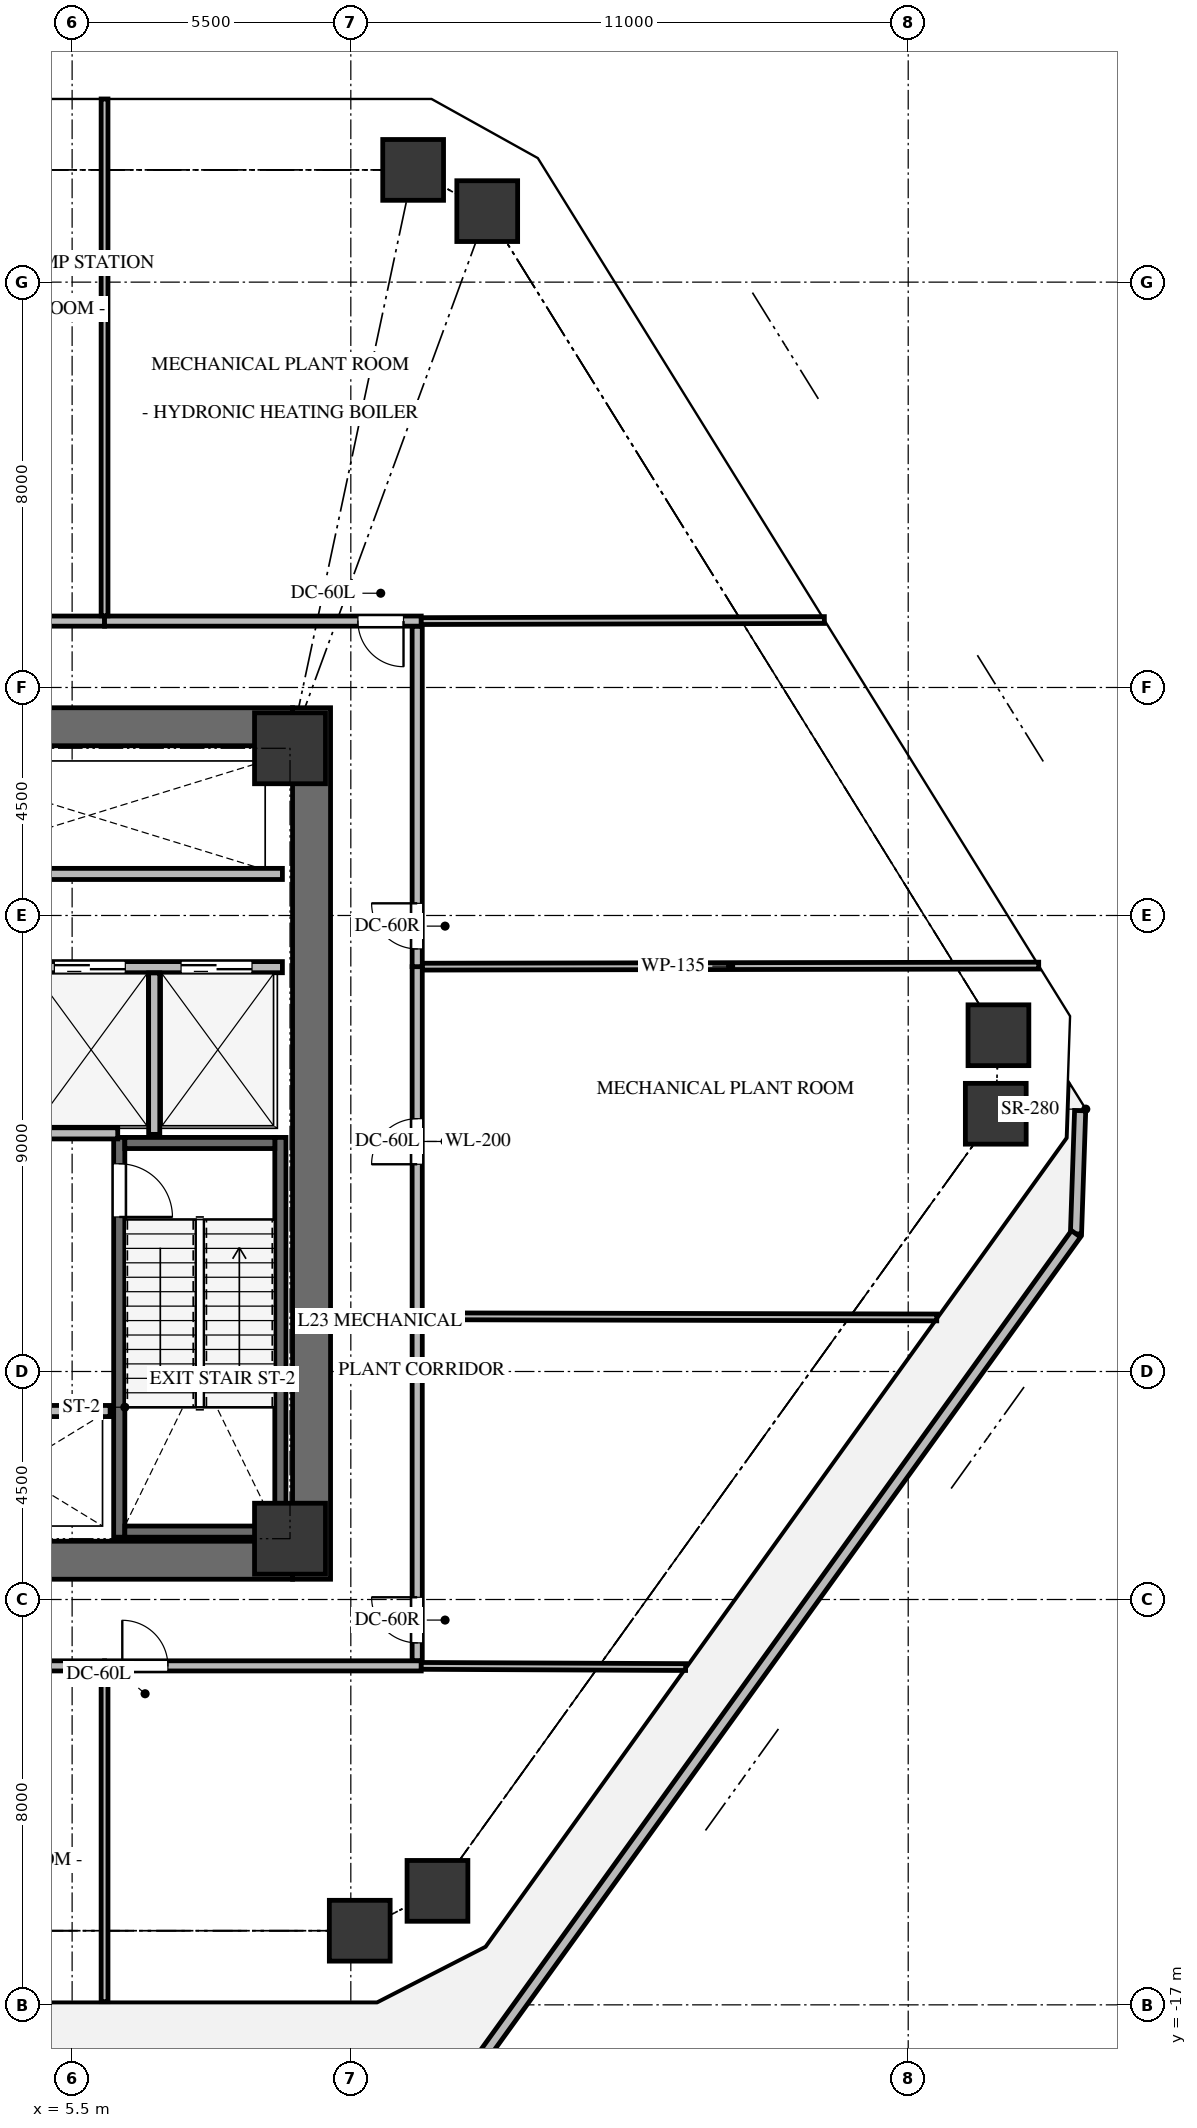
"""IFC4 building model, lengths in metres.
Left out: names, types, materials, properties, quantities, classifications, styles, units other than length and angle.
Written with IfcOpenShell. Run it as: python <this file> out.ifc"""

import sys

from ifc_helpers import new_model, si_unit, direction, frame, frame_2d, origin, origin_2d, place, context, subcontext, project, spatial, rectangle, extrude, source, transform, mapped, element, fill, save


model = new_model("IFC4")
c1 = context("Model", 3, precision=1e-05, world=origin(), true_north=direction((0.0, 1.0)))
c2 = subcontext(c1, "Body", "Model", "MODEL_VIEW")
j1 = project(units=[si_unit("LENGTHUNIT", "METRE"), si_unit("PLANEANGLEUNIT", "RADIAN")], contexts=[c1])
p1 = place(None, origin())
s1 = spatial("IfcSite", under=j1, at=p1, CompositionType="ELEMENT")
p2 = place(p1, origin())
s2 = spatial("IfcBuilding", under=s1, at=p2, CompositionType="ELEMENT")
p3 = place(p2, frame((0.0, 0.0, 88.5)))
s3 = spatial("IfcBuildingStorey", under=s2, at=p3, CompositionType="ELEMENT", Elevation=88.5)
p4 = place(p3, frame((10.225, -8.6, 0.0), z_axis=(0.0, 0.0, 1.0), x_axis=(0.0, 1.0, 0.0)))
e1 = element("IfcWall", 1, at=p4, inside=s3, PredefinedType="SHEAR", context=c2, shape_type="SweptSolid", body=[
    extrude(rectangle(XDim=17.2, YDim=0.75, at=frame_2d((8.6, 0.0))), origin(), (0.0, 0.0, 1.0), 4.8),
])
p5 = place(p3, frame((2.1, -8.225, 0.0), z_axis=(0.0, 0.0, 1.0), x_axis=(1.0, 0.0, 0.0)))
e2 = element("IfcWall", 2, at=p5, inside=s3, PredefinedType="SHEAR", context=c2, shape_type="SweptSolid", body=[
    extrude(rectangle(XDim=7.75, YDim=0.75, at=frame_2d((3.875, 0.0))), origin(), (0.0, 0.0, 1.0), 4.8),
])
p6 = place(p3, frame((-9.85, 8.225, 0.0), z_axis=(0.0, 0.0, 1.0), x_axis=(1.0, 0.0, 0.0)))
e3 = element("IfcWall", 3, at=p6, inside=s3, PredefinedType="SHEAR", context=c2, shape_type="SweptSolid", body=[
    extrude(rectangle(XDim=19.7, YDim=0.75, at=frame_2d((9.85, 0.0))), origin(), (0.0, 0.0, 1.0), 4.8),
])
p7 = place(p3, frame((9.61, -7.77, -0.3), z_axis=(0.0, 0.0, 1.0), x_axis=(0.0, 1.0, 0.0)))
e4 = element("IfcWall", 4, at=p7, inside=s3, PredefinedType="SHEAR", context=c2, shape_type="SweptSolid", body=[
    extrude(rectangle(XDim=7.89, YDim=0.22, at=frame_2d((3.945, 0.0))), origin(), (0.0, 0.0, 1.0), 4.8),
])
p8 = place(p3, frame((6.43, 0.12, -0.3), z_axis=(0.0, 0.0, 1.0), x_axis=(0.0, -1.0, 0.0)))
e5 = element("IfcWall", 5, at=p8, inside=s3, PredefinedType="SHEAR", context=c2, shape_type="SweptSolid", body=[
    extrude(rectangle(XDim=7.89, YDim=0.22, at=frame_2d((3.945, 0.0))), origin(), (0.0, 0.0, 1.0), 4.8),
])
p9 = place(p8, frame((0.52, 0.0, 0.0)))
e6 = element("IfcOpeningElement", 6, at=p9, cuts=e5, PredefinedType="OPENING", context=c2, shape_type="SweptSolid", body=[
    extrude(rectangle(XDim=1.05, YDim=2.15, at=frame_2d((0.525, 1.075))), frame((0.0, 0.12, 0.0), z_axis=(0.0, -1.0, 0.0), x_axis=(1.0, 0.0, 0.0)), (0.0, 0.0, 1.0), 0.24),
])
for number, where, z_axis, x_axis in (
    (7, (6.54, -7.66, -0.3), (0.0, 0.0, 1.0), (1.0, 0.0, 0.0)),
    (8, (9.5, 0.01, -0.3), (0.0, 0.0, 1.0), (-1.0, 0.0, 0.0)),
):
    element("IfcWall", number, at=place(p3, frame(where, z_axis=z_axis, x_axis=x_axis)), inside=s3, PredefinedType="SHEAR", context=c2, shape_type="SweptSolid", body=[
        extrude(rectangle(XDim=2.96, YDim=0.22, at=frame_2d((1.48, 0.0))), origin(), (0.0, 0.0, 1.0), 4.8),
    ])
m1 = source(origin(), c2, "Body", "SweptSolid", [
    extrude(rectangle(XDim=1.4, YDim=1.4, at=origin_2d()), origin(), (0.0, 0.0, 1.0), 4.8),
])
for number, where, z_axis, x_axis in (
    (9, (9.8, -7.8, -0.3), (0.0, 0.0, 1.0), (1.0, 0.0, 0.0)),
    (10, (9.8, 7.8, -0.3), (0.0, 0.0, 1.0), (1.0, 0.0, 0.0)),
):
    element("IfcColumn", number, at=place(p3, frame(where, z_axis=z_axis, x_axis=x_axis)), inside=s3, PredefinedType="COLUMN", context=c2, shape_type="MappedRepresentation", body=[
        mapped(m1, transform((0.0, 0.0, 0.0), x_axis=(1.0, 0.0, 0.0), y_axis=(0.0, 1.0, 0.0), z_axis=(0.0, 0.0, 1.0), scale=1.0)),
    ])
m2 = source(origin(), c2, "Body", "SweptSolid", [
    extrude(rectangle(XDim=1.2, YDim=1.2, at=origin_2d()), origin(), (0.0, 0.0, 1.0), 4.8),
])
for number, where, z_axis, x_axis in (
    (11, (12.23, 19.215, -0.3), (0.0, 0.0, 1.0), (1.0, 0.0, 0.0)),
    (12, (13.692, 18.401, -0.3), (0.0, 0.0, 1.0), (1.0, 0.0, 0.0)),
    (13, (23.781, 2.137, -0.3), (0.0, 0.0, 1.0), (1.0, 0.0, 0.0)),
    (14, (23.728, 0.587, -0.3), (0.0, 0.0, 1.0), (1.0, 0.0, 0.0)),
    (15, (12.71, -14.75, -0.3), (0.0, 0.0, 1.0), (1.0, 0.0, 0.0)),
    (16, (11.176, -15.537, -0.3), (0.0, 0.0, 1.0), (1.0, 0.0, 0.0)),
):
    element("IfcColumn", number, at=place(p3, frame(where, z_axis=z_axis, x_axis=x_axis)), inside=s3, PredefinedType="COLUMN", context=c2, shape_type="MappedRepresentation", body=[
        mapped(m2, transform((0.0, 0.0, 0.0), x_axis=(1.0, 0.0, 0.0), y_axis=(0.0, 1.0, 0.0), z_axis=(0.0, 0.0, 1.0), scale=1.0)),
    ])
p10 = place(p3, frame((25.393, 0.648, 0.0), z_axis=(0.0, 0.0, 1.0), x_axis=(-0.033815990117, -0.999428075858, 0.0)))
e17 = element("IfcWall", 17, at=p10, inside=s3, PredefinedType="PARAPET", context=c2, shape_type="SweptSolid", body=[
    extrude(rectangle(XDim=2.433, YDim=0.22, at=frame_2d((1.217, 0.0))), origin(), (0.0, 0.0, 1.0), 1.2),
])
p11 = place(p3, frame((25.311, -1.783, 0.0), z_axis=(0.0, 0.0, 1.0), x_axis=(-0.584819348165, -0.81116356551, 0.0)))
e18 = element("IfcWall", 18, at=p11, inside=s3, PredefinedType="PARAPET", context=c2, shape_type="SweptSolid", body=[
    extrude(rectangle(XDim=21.441, YDim=0.22, at=frame_2d((10.72, 0.0))), origin(), (0.0, 0.0, 1.0), 1.2),
])
p12 = place(p3, frame((4.6, 3.48, 0.0), z_axis=(0.0, 0.0, 1.0), x_axis=(1.0, 0.0, 0.0)))
e19 = element("IfcWall", 19, at=p12, inside=s3, PredefinedType="SOLIDWALL", context=c2, shape_type="SweptSolid", body=[
    extrude(rectangle(XDim=5.05, YDim=0.22, at=frame_2d((2.525, 0.0))), origin(), (0.0, 0.0, 1.0), 4.485),
])
p13 = place(p12, frame((0.55, 0.0, 0.0)))
e20 = element("IfcOpeningElement", 20, at=p13, cuts=e19, PredefinedType="OPENING", context=c2, shape_type="SweptSolid", body=[
    extrude(rectangle(XDim=1.4, YDim=2.15, at=frame_2d((0.7, 1.075))), frame((0.0, 0.12, 0.0), z_axis=(0.0, -1.0, 0.0), x_axis=(1.0, 0.0, 0.0)), (0.0, 0.0, 1.0), 0.24),
])
p14 = place(p12, frame((3.05, 0.0, 0.0)))
e21 = element("IfcOpeningElement", 21, at=p14, cuts=e19, PredefinedType="OPENING", context=c2, shape_type="SweptSolid", body=[
    extrude(rectangle(XDim=1.4, YDim=2.15, at=frame_2d((0.7, 1.075))), frame((0.0, 0.12, 0.0), z_axis=(0.0, -1.0, 0.0), x_axis=(1.0, 0.0, 0.0)), (0.0, 0.0, 1.0), 0.24),
])
p15 = place(p3, frame((7.12, 0.18, 0.0), z_axis=(0.0, 0.0, 1.0), x_axis=(0.0, 1.0, 0.0)))
e22 = element("IfcWall", 22, at=p15, inside=s3, PredefinedType="SOLIDWALL", context=c2, shape_type="SweptSolid", body=[
    extrude(rectangle(XDim=3.186, YDim=0.22, at=frame_2d((1.593, 0.0))), origin(), (0.0, 0.0, 1.0), 4.485),
])
p16 = place(p3, frame((4.734, 0.2, 0.0), z_axis=(0.0, 0.0, 1.0), x_axis=(1.0, 0.0, 0.0)))
e23 = element("IfcWall", 23, at=p16, inside=s3, PredefinedType="SOLIDWALL", context=c2, shape_type="SweptSolid", body=[
    extrude(rectangle(XDim=1.666, YDim=0.22, at=frame_2d((0.833, 0.0))), origin(), (0.0, 0.0, 1.0), 4.485),
])
p17 = place(p3, frame((2.35, -5.28, 0.0), z_axis=(0.0, 0.0, 1.0), x_axis=(1.0, 0.0, 0.0)))
e24 = element("IfcWall", 24, at=p17, inside=s3, PredefinedType="SOLIDWALL", context=c2, shape_type="SweptSolid", body=[
    extrude(rectangle(XDim=3.9, YDim=0.22, at=frame_2d((1.95, 0.0))), origin(), (0.0, 0.0, 1.0), 4.485),
])
p18 = place(p3, frame((2.325, 5.32, 0.0), z_axis=(0.0, 0.0, 1.0), x_axis=(1.0, 0.0, 0.0)))
e25 = element("IfcWall", 25, at=p18, inside=s3, PredefinedType="SOLIDWALL", context=c2, shape_type="SweptSolid", body=[
    extrude(rectangle(XDim=7.325, YDim=0.22, at=frame_2d((3.663, 0.0))), origin(), (0.0, 0.0, 1.0), 4.485),
])
p19 = place(p3, frame((6.14, 10.31, 0.0), z_axis=(0.0, 0.0, 1.0), x_axis=(-1.0, 0.0, 0.0)))
e26 = element("IfcWall", 26, at=p19, inside=s3, PredefinedType="SOLIDWALL", context=c2, shape_type="SweptSolid", body=[
    extrude(rectangle(XDim=6.1, YDim=0.2, at=frame_2d((3.05, 0.0))), origin(), (0.0, 0.0, 1.0), 4.048),
])
p20 = place(p19, frame((2.6, 0.0, 0.0)))
e27 = element("IfcOpeningElement", 27, at=p20, cuts=e26, PredefinedType="OPENING", context=c2, shape_type="SweptSolid", body=[
    extrude(rectangle(XDim=0.9, YDim=2.05, at=frame_2d((0.45, 1.025))), frame((0.0, 0.11, 0.0), z_axis=(0.0, -1.0, 0.0), x_axis=(1.0, 0.0, 0.0)), (0.0, 0.0, 1.0), 0.22),
])
p21 = place(p3, frame((12.39, 10.31, 0.0), z_axis=(0.0, 0.0, 1.0), x_axis=(-1.0, 0.0, 0.0)))
e28 = element("IfcWall", 28, at=p21, inside=s3, PredefinedType="SOLIDWALL", context=c2, shape_type="SweptSolid", body=[
    extrude(rectangle(XDim=6.25, YDim=0.2, at=frame_2d((3.125, 0.0))), origin(), (0.0, 0.0, 1.0), 3.652),
])
p22 = place(p21, frame((0.35, 0.0, 0.0)))
e29 = element("IfcOpeningElement", 29, at=p22, cuts=e28, PredefinedType="OPENING", context=c2, shape_type="SweptSolid", body=[
    extrude(rectangle(XDim=0.9, YDim=2.05, at=frame_2d((0.45, 1.025))), frame((0.0, 0.11, 0.0), z_axis=(0.0, -1.0, 0.0), x_axis=(1.0, 0.0, 0.0)), (0.0, 0.0, 1.0), 0.22),
])
p23 = place(p3, frame((0.04, -10.31, 0.0), z_axis=(0.0, 0.0, 1.0), x_axis=(1.0, 0.0, 0.0)))
e30 = element("IfcWall", 30, at=p23, inside=s3, PredefinedType="SOLIDWALL", context=c2, shape_type="SweptSolid", body=[
    extrude(rectangle(XDim=6.1, YDim=0.2, at=frame_2d((3.05, 0.0))), origin(), (0.0, 0.0, 1.0), 3.652),
])
p24 = place(p23, frame((2.6, 0.0, 0.0)))
e31 = element("IfcOpeningElement", 31, at=p24, cuts=e30, PredefinedType="OPENING", context=c2, shape_type="SweptSolid", body=[
    extrude(rectangle(XDim=0.9, YDim=2.05, at=frame_2d((0.45, 1.025))), frame((0.0, 0.11, 0.0), z_axis=(0.0, -1.0, 0.0), x_axis=(1.0, 0.0, 0.0)), (0.0, 0.0, 1.0), 0.22),
])
p25 = place(p3, frame((6.14, -10.31, 0.0), z_axis=(0.0, 0.0, 1.0), x_axis=(1.0, 0.0, 0.0)))
e32 = element("IfcWall", 32, at=p25, inside=s3, PredefinedType="SOLIDWALL", context=c2, shape_type="SweptSolid", body=[
    extrude(rectangle(XDim=6.25, YDim=0.2, at=frame_2d((3.125, 0.0))), origin(), (0.0, 0.0, 1.0), 3.652),
])
p26 = place(p25, frame((0.35, 0.0, 0.0)))
e33 = element("IfcOpeningElement", 33, at=p26, cuts=e32, PredefinedType="OPENING", context=c2, shape_type="SweptSolid", body=[
    extrude(rectangle(XDim=0.9, YDim=2.05, at=frame_2d((0.45, 1.025))), frame((0.0, 0.11, 0.0), z_axis=(0.0, -1.0, 0.0), x_axis=(1.0, 0.0, 0.0)), (0.0, 0.0, 1.0), 0.22),
])
p27 = place(p3, frame((12.31, -10.206, 0.0), z_axis=(0.0, 0.0, 1.0), x_axis=(0.0, 1.0, 0.0)))
e34 = element("IfcWall", 34, at=p27, inside=s3, PredefinedType="SOLIDWALL", context=c2, shape_type="SweptSolid", body=[
    extrude(rectangle(XDim=6.796, YDim=0.2, at=frame_2d((3.398, 0.0))), origin(), (0.0, 0.0, 1.0), 4.485),
])
p28 = place(p27, frame((0.35, 0.0, 0.0)))
e35 = element("IfcOpeningElement", 35, at=p28, cuts=e34, PredefinedType="OPENING", context=c2, shape_type="SweptSolid", body=[
    extrude(rectangle(XDim=0.9, YDim=2.05, at=frame_2d((0.45, 1.025))), frame((0.0, 0.11, 0.0), z_axis=(0.0, -1.0, 0.0), x_axis=(1.0, 0.0, 0.0)), (0.0, 0.0, 1.0), 0.22),
])
p29 = place(p3, frame((12.31, -3.41, 0.0), z_axis=(0.0, 0.0, 1.0), x_axis=(0.0, 1.0, 0.0)))
e36 = element("IfcWall", 36, at=p29, inside=s3, PredefinedType="SOLIDWALL", context=c2, shape_type="SweptSolid", body=[
    extrude(rectangle(XDim=6.9, YDim=0.2, at=frame_2d((3.45, 0.0))), origin(), (0.0, 0.0, 1.0), 3.652),
])
p30 = place(p29, frame((3.0, 0.0, 0.0)))
e37 = element("IfcOpeningElement", 37, at=p30, cuts=e36, PredefinedType="OPENING", context=c2, shape_type="SweptSolid", body=[
    extrude(rectangle(XDim=0.9, YDim=2.05, at=frame_2d((0.45, 1.025))), frame((0.0, 0.11, 0.0), z_axis=(0.0, -1.0, 0.0), x_axis=(1.0, 0.0, 0.0)), (0.0, 0.0, 1.0), 0.22),
])
p31 = place(p3, frame((12.31, 3.49, 0.0), z_axis=(0.0, 0.0, 1.0), x_axis=(0.0, 1.0, 0.0)))
e38 = element("IfcWall", 38, at=p31, inside=s3, PredefinedType="SOLIDWALL", context=c2, shape_type="SweptSolid", body=[
    extrude(rectangle(XDim=6.716, YDim=0.2, at=frame_2d((3.358, 0.0))), origin(), (0.0, 0.0, 1.0), 4.485),
])
p32 = place(p31, frame((0.35, 0.0, 0.0)))
e39 = element("IfcOpeningElement", 39, at=p32, cuts=e38, PredefinedType="OPENING", context=c2, shape_type="SweptSolid", body=[
    extrude(rectangle(XDim=0.9, YDim=2.05, at=frame_2d((0.45, 1.025))), frame((0.0, 0.11, 0.0), z_axis=(0.0, -1.0, 0.0), x_axis=(1.0, 0.0, 0.0)), (0.0, 0.0, 1.0), 0.22),
])
p33 = place(p3, frame((6.14, 20.615, 0.0), z_axis=(0.0, 0.0, 1.0), x_axis=(0.0, -1.0, 0.0)))
e40 = element("IfcWall", 40, at=p33, inside=s3, PredefinedType="PARTITIONING", context=c2, shape_type="SweptSolid", body=[
    extrude(rectangle(XDim=10.201, YDim=0.135, at=frame_2d((5.101, 0.0))), origin(), (0.0, 0.0, 1.0), 3.82),
])
p34 = place(p3, frame((20.345, 10.331, 0.0), z_axis=(0.0, 0.0, 1.0), x_axis=(-0.999996597928, -0.002608473296, 0.0)))
e41 = element("IfcWall", 41, at=p34, inside=s3, PredefinedType="PARTITIONING", context=c2, shape_type="SweptSolid", body=[
    extrude(rectangle(XDim=7.956, YDim=0.135, at=frame_2d((3.978, 0.0))), origin(), (0.0, 0.0, 1.0), 3.82),
])
p35 = place(p3, frame((6.14, -10.414, 0.0), z_axis=(0.0, 0.0, 1.0), x_axis=(0.0, -1.0, 0.0)))
e42 = element("IfcWall", 42, at=p35, inside=s3, PredefinedType="PARTITIONING", context=c2, shape_type="SweptSolid", body=[
    extrude(rectangle(XDim=6.523, YDim=0.135, at=frame_2d((3.261, 0.0))), origin(), (0.0, 0.0, 1.0), 3.652),
])
p36 = place(p3, frame((12.39, -10.31, 0.0), z_axis=(0.0, 0.0, 1.0), x_axis=(0.999990324999, -0.004398853037, 0.0)))
e43 = element("IfcWall", 43, at=p36, inside=s3, PredefinedType="PARTITIONING", context=c2, shape_type="SweptSolid", body=[
    extrude(rectangle(XDim=5.217, YDim=0.135, at=frame_2d((2.608, 0.0))), origin(), (0.0, 0.0, 1.0), 3.82),
])
p37 = place(p3, frame((12.414, -3.41, 0.0), z_axis=(0.0, 0.0, 1.0), x_axis=(0.999997389085, -0.002285131022, 0.0)))
e44 = element("IfcWall", 44, at=p37, inside=s3, PredefinedType="PARTITIONING", context=c2, shape_type="SweptSolid", body=[
    extrude(rectangle(XDim=10.15, YDim=0.135, at=frame_2d((5.075, 0.0))), origin(), (0.0, 0.0, 1.0), 3.82),
])
p38 = place(p3, frame((12.414, 3.49, 0.0), z_axis=(0.0, 0.0, 1.0), x_axis=(0.999998544192, 0.001706345129, 0.0)))
e45 = element("IfcWall", 45, at=p38, inside=s3, PredefinedType="PARTITIONING", context=c2, shape_type="SweptSolid", body=[
    extrude(rectangle(XDim=12.162, YDim=0.135, at=frame_2d((6.081, 0.0))), origin(), (0.0, 0.0, 1.0), 3.82),
])
m3 = source(origin(), c2, "Body", "SweptSolid", [
    extrude(rectangle(XDim=1.05, YDim=2.15, at=frame_2d((0.525, 1.075))), frame((0.0, 0.025, 0.0), z_axis=(0.0, -1.0, 0.0), x_axis=(1.0, 0.0, 0.0)), (0.0, 0.0, 1.0), 0.05),
])
p39 = place(p9, origin())
e46 = element("IfcDoor", 46, at=p39, inside=s3, OperationType="SINGLE_SWING_RIGHT", PredefinedType="DOOR", context=c2, shape_type="MappedRepresentation", body=[
    mapped(m3, transform((0.0, 0.0, 0.0), x_axis=(1.0, 0.0, 0.0), y_axis=(0.0, 1.0, 0.0), z_axis=(0.0, 0.0, 1.0), scale=1.0)),
])
fill(e6, e46)
m4 = source(origin(), c2, "Body", "SweptSolid", [
    extrude(rectangle(XDim=1.4, YDim=2.15, at=frame_2d((0.7, 1.075))), frame((0.0, 0.025, 0.0), z_axis=(0.0, -1.0, 0.0), x_axis=(1.0, 0.0, 0.0)), (0.0, 0.0, 1.0), 0.05),
])
p40 = place(p13, origin())
e47 = element("IfcDoor", 47, at=p40, inside=s3, OperationType="DOUBLE_DOOR_SLIDING", PredefinedType="DOOR", context=c2, shape_type="MappedRepresentation", body=[
    mapped(m4, transform((0.0, 0.0, 0.0), x_axis=(1.0, 0.0, 0.0), y_axis=(0.0, 1.0, 0.0), z_axis=(0.0, 0.0, 1.0), scale=1.0)),
])
fill(e20, e47)
p41 = place(p14, origin())
e48 = element("IfcDoor", 48, at=p41, inside=s3, OperationType="DOUBLE_DOOR_SLIDING", PredefinedType="DOOR", context=c2, shape_type="MappedRepresentation", body=[
    mapped(m4, transform((0.0, 0.0, 0.0), x_axis=(1.0, 0.0, 0.0), y_axis=(0.0, 1.0, 0.0), z_axis=(0.0, 0.0, 1.0), scale=1.0)),
])
fill(e21, e48)
m5 = source(origin(), c2, "Body", "SweptSolid", [
    extrude(rectangle(XDim=0.9, YDim=2.05, at=frame_2d((0.45, 1.025))), frame((0.0, 0.025, 0.0), z_axis=(0.0, -1.0, 0.0), x_axis=(1.0, 0.0, 0.0)), (0.0, 0.0, 1.0), 0.05),
])
p42 = place(p22, origin())
e49 = element("IfcDoor", 49, at=p42, inside=s3, OperationType="SINGLE_SWING_LEFT", PredefinedType="DOOR", context=c2, shape_type="MappedRepresentation", body=[
    mapped(m5, transform((0.0, 0.0, 0.0), x_axis=(1.0, 0.0, 0.0), y_axis=(0.0, 1.0, 0.0), z_axis=(0.0, 0.0, 1.0), scale=1.0)),
])
fill(e29, e49)
p43 = place(p26, origin())
e50 = element("IfcDoor", 50, at=p43, inside=s3, OperationType="SINGLE_SWING_LEFT", PredefinedType="DOOR", context=c2, shape_type="MappedRepresentation", body=[
    mapped(m5, transform((0.0, 0.0, 0.0), x_axis=(1.0, 0.0, 0.0), y_axis=(0.0, 1.0, 0.0), z_axis=(0.0, 0.0, 1.0), scale=1.0)),
])
fill(e33, e50)
m6 = source(origin(), c2, "Body", "SweptSolid", [
    extrude(rectangle(XDim=0.9, YDim=2.05, at=frame_2d((0.45, 1.025))), frame((0.0, 0.025, 0.0), z_axis=(0.0, -1.0, 0.0), x_axis=(1.0, 0.0, 0.0)), (0.0, 0.0, 1.0), 0.05),
])
p44 = place(p28, origin())
e51 = element("IfcDoor", 51, at=p44, inside=s3, OperationType="SINGLE_SWING_RIGHT", PredefinedType="DOOR", context=c2, shape_type="MappedRepresentation", body=[
    mapped(m6, transform((0.0, 0.0, 0.0), x_axis=(1.0, 0.0, 0.0), y_axis=(0.0, 1.0, 0.0), z_axis=(0.0, 0.0, 1.0), scale=1.0)),
])
fill(e35, e51)
p45 = place(p30, origin())
e52 = element("IfcDoor", 52, at=p45, inside=s3, OperationType="SINGLE_SWING_LEFT", PredefinedType="DOOR", context=c2, shape_type="MappedRepresentation", body=[
    mapped(m5, transform((0.0, 0.0, 0.0), x_axis=(1.0, 0.0, 0.0), y_axis=(0.0, 1.0, 0.0), z_axis=(0.0, 0.0, 1.0), scale=1.0)),
])
fill(e37, e52)
p46 = place(p32, origin())
e53 = element("IfcDoor", 53, at=p46, inside=s3, OperationType="SINGLE_SWING_RIGHT", PredefinedType="DOOR", context=c2, shape_type="MappedRepresentation", body=[
    mapped(m6, transform((0.0, 0.0, 0.0), x_axis=(1.0, 0.0, 0.0), y_axis=(0.0, 1.0, 0.0), z_axis=(0.0, 0.0, 1.0), scale=1.0)),
])
fill(e39, e53)
save(model, sys.argv[1])
